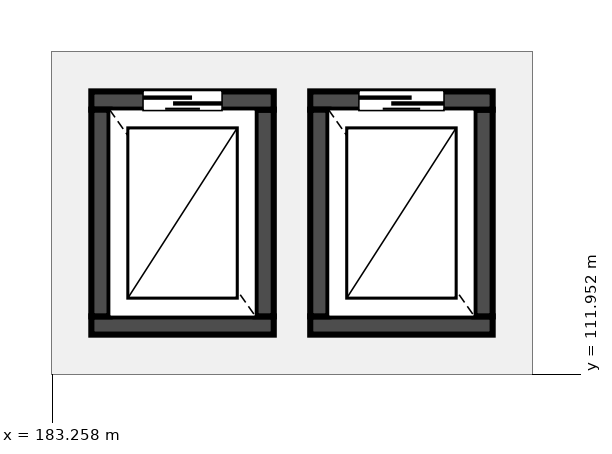
"""IFC4 building model, lengths in metres.
Left out: names, types, materials, properties, quantities, classifications, styles, units other than length and angle.
Written with IfcOpenShell. Run it as: python <this file> out.ifc"""

import sys

from ifc_helpers import new_model, si_unit, direction, frame, frame_2d, origin, place, context, subcontext, project, spatial, rectangle, extrude, element, fill, save


model = new_model("IFC4")
c1 = context("Model", 3, precision=1e-05, world=origin(), true_north=direction((0.0, 1.0)))
c2 = subcontext(c1, "Body", "Model", "MODEL_VIEW")
j1 = project(units=[si_unit("LENGTHUNIT", "METRE"), si_unit("PLANEANGLEUNIT", "RADIAN")], contexts=[c1])
p1 = place(None, origin())
s1 = spatial("IfcSite", under=j1, at=p1, CompositionType="ELEMENT")
p2 = place(p1, origin())
s2 = spatial("IfcBuilding", under=s1, at=p2, CompositionType="ELEMENT")
p3 = place(p2, frame((0.0, 0.0, 5.1)))
s3 = spatial("IfcBuildingStorey", under=s2, at=p3, CompositionType="ELEMENT", Elevation=5.1)
p4 = place(p3, frame((183.9, 112.75, 0.0), z_axis=(0.0, 0.0, 1.0), x_axis=(1.0, 0.0, 0.0)))
e1 = element("IfcWall", 1, at=p4, inside=s3, PredefinedType="SHEAR", context=c2, shape_type="SweptSolid", body=[
    extrude(rectangle(XDim=3.0, YDim=0.3, at=frame_2d((1.5, 0.0))), origin(), (0.0, 0.0, 1.0), 4.8),
])
p5 = place(p3, frame((186.75, 112.9, 0.0), z_axis=(0.0, 0.0, 1.0), x_axis=(0.0, 1.0, 0.0)))
e2 = element("IfcWall", 2, at=p5, inside=s3, PredefinedType="SHEAR", context=c2, shape_type="SweptSolid", body=[
    extrude(rectangle(XDim=3.4, YDim=0.3, at=frame_2d((1.7, 0.0))), origin(), (0.0, 0.0, 1.0), 4.8),
])
p6 = place(p3, frame((186.9, 116.45, 0.0), z_axis=(0.0, 0.0, 1.0), x_axis=(-1.0, 0.0, 0.0)))
e3 = element("IfcWall", 3, at=p6, inside=s3, PredefinedType="SHEAR", context=c2, shape_type="SweptSolid", body=[
    extrude(rectangle(XDim=3.0, YDim=0.3, at=frame_2d((1.5, 0.0))), origin(), (0.0, 0.0, 1.0), 4.8),
])
p7 = place(p6, frame((0.85, 0.0, 0.0)))
e4 = element("IfcOpeningElement", 4, at=p7, cuts=e3, PredefinedType="OPENING", context=c2, shape_type="SweptSolid", body=[
    extrude(rectangle(XDim=1.3, YDim=2.3, at=frame_2d((0.65, 1.15))), frame((0.0, 0.16, 0.0), z_axis=(0.0, -1.0, 0.0), x_axis=(1.0, 0.0, 0.0)), (0.0, 0.0, 1.0), 0.32),
])
p8 = place(p3, frame((184.05, 116.3, 0.0), z_axis=(0.0, 0.0, 1.0), x_axis=(0.0, -1.0, 0.0)))
e5 = element("IfcWall", 5, at=p8, inside=s3, PredefinedType="SHEAR", context=c2, shape_type="SweptSolid", body=[
    extrude(rectangle(XDim=3.4, YDim=0.3, at=frame_2d((1.7, 0.0))), origin(), (0.0, 0.0, 1.0), 4.8),
])
p9 = place(p3, frame((187.5, 112.75, 0.0), z_axis=(0.0, 0.0, 1.0), x_axis=(1.0, 0.0, 0.0)))
e6 = element("IfcWall", 6, at=p9, inside=s3, PredefinedType="SHEAR", context=c2, shape_type="SweptSolid", body=[
    extrude(rectangle(XDim=3.0, YDim=0.3, at=frame_2d((1.5, 0.0))), origin(), (0.0, 0.0, 1.0), 4.8),
])
p10 = place(p3, frame((190.35, 112.9, 0.0), z_axis=(0.0, 0.0, 1.0), x_axis=(0.0, 1.0, 0.0)))
e7 = element("IfcWall", 7, at=p10, inside=s3, PredefinedType="SHEAR", context=c2, shape_type="SweptSolid", body=[
    extrude(rectangle(XDim=3.4, YDim=0.3, at=frame_2d((1.7, 0.0))), origin(), (0.0, 0.0, 1.0), 4.8),
])
p11 = place(p3, frame((190.5, 116.45, 0.0), z_axis=(0.0, 0.0, 1.0), x_axis=(-1.0, 0.0, 0.0)))
e8 = element("IfcWall", 8, at=p11, inside=s3, PredefinedType="SHEAR", context=c2, shape_type="SweptSolid", body=[
    extrude(rectangle(XDim=3.0, YDim=0.3, at=frame_2d((1.5, 0.0))), origin(), (0.0, 0.0, 1.0), 4.8),
])
p12 = place(p11, frame((0.8, 0.0, 0.0)))
e9 = element("IfcOpeningElement", 9, at=p12, cuts=e8, PredefinedType="OPENING", context=c2, shape_type="SweptSolid", body=[
    extrude(rectangle(XDim=1.4, YDim=2.3, at=frame_2d((0.7, 1.15))), frame((0.0, 0.16, 0.0), z_axis=(0.0, -1.0, 0.0), x_axis=(1.0, 0.0, 0.0)), (0.0, 0.0, 1.0), 0.32),
])
p13 = place(p3, frame((187.65, 116.3, 0.0), z_axis=(0.0, 0.0, 1.0), x_axis=(0.0, -1.0, 0.0)))
e10 = element("IfcWall", 10, at=p13, inside=s3, PredefinedType="SHEAR", context=c2, shape_type="SweptSolid", body=[
    extrude(rectangle(XDim=3.4, YDim=0.3, at=frame_2d((1.7, 0.0))), origin(), (0.0, 0.0, 1.0), 4.8),
])
p14 = place(p7, origin())
e11 = element("IfcDoor", 11, at=p14, inside=s3, OperationType="SLIDING_TO_RIGHT", PredefinedType="DOOR", context=c2, shape_type="SweptSolid", body=[
    extrude(rectangle(XDim=1.3, YDim=2.3, at=frame_2d((0.65, 1.15))), frame((0.0, 0.025, 0.0), z_axis=(0.0, -1.0, 0.0), x_axis=(1.0, 0.0, 0.0)), (0.0, 0.0, 1.0), 0.05),
])
fill(e4, e11)
p15 = place(p12, origin())
e12 = element("IfcDoor", 12, at=p15, inside=s3, OperationType="SLIDING_TO_RIGHT", PredefinedType="DOOR", context=c2, shape_type="SweptSolid", body=[
    extrude(rectangle(XDim=1.4, YDim=2.3, at=frame_2d((0.7, 1.15))), frame((0.0, 0.025, 0.0), z_axis=(0.0, -1.0, 0.0), x_axis=(1.0, 0.0, 0.0)), (0.0, 0.0, 1.0), 0.05),
])
fill(e9, e12)
save(model, sys.argv[1])
